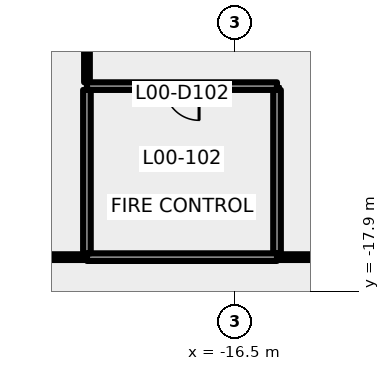
"""IFC4 building model, lengths in metres.
Left out: names, types, materials, properties, quantities, classifications, styles, units other than length and angle.
Written with IfcOpenShell. Run it as: python <this file> out.ifc"""

import sys

from ifc_helpers import new_model, si_unit, direction, frame, frame_2d, origin, place, context, subcontext, project, spatial, rectangle, extrude, element, fill, save


model = new_model("IFC4")
c1 = context("Model", 3, precision=1e-05, world=origin(), true_north=direction((0.0, 1.0)))
c2 = subcontext(c1, "Body", "Model", "MODEL_VIEW")
j1 = project(units=[si_unit("LENGTHUNIT", "METRE"), si_unit("PLANEANGLEUNIT", "RADIAN")], contexts=[c1])
p1 = place(None, origin())
s1 = spatial("IfcSite", under=j1, at=p1, CompositionType="ELEMENT")
p2 = place(p1, origin())
s2 = spatial("IfcBuilding", under=s1, at=p2, CompositionType="ELEMENT")
p3 = place(p2, origin())
s3 = spatial("IfcBuildingStorey", under=s2, at=p3, CompositionType="ELEMENT", Elevation=0.0)
p4 = place(p3, frame((-15.4, -12.5, 0.0), z_axis=(0.0, 0.0, 1.0), x_axis=(-1.0, 0.0, 0.0)))
e1 = element("IfcWall", 1, at=p4, inside=s3, PredefinedType="PARTITIONING", context=c2, shape_type="SweptSolid", body=[
    extrude(rectangle(XDim=5.0, YDim=0.2, at=frame_2d((2.5, 0.0))), origin(), (0.0, 0.0, 1.0), 6.7),
])
p5 = place(p4, frame((2.05, 0.0, 0.0)))
e2 = element("IfcOpeningElement", 2, at=p5, cuts=e1, PredefinedType="OPENING", context=c2, shape_type="SweptSolid", body=[
    extrude(rectangle(XDim=0.9, YDim=2.1, at=frame_2d((0.45, 1.05))), frame((0.0, 0.111, 0.0), z_axis=(0.0, -1.0, 0.0), x_axis=(1.0, 0.0, 0.0)), (0.0, 0.0, 1.0), 0.221),
])
p6 = place(p3, frame((-15.399, -16.9, 0.0), z_axis=(0.0, 0.0, 1.0), x_axis=(0.0, 1.0, 0.0)))
e3 = element("IfcWall", 3, at=p6, inside=s3, PredefinedType="PARTITIONING", context=c2, shape_type="SweptSolid", body=[
    extrude(rectangle(XDim=4.3, YDim=0.2, at=frame_2d((2.15, 0.0))), origin(), (0.0, 0.0, 1.0), 6.0),
])
p7 = place(p3, frame((-15.4, -17.0, 0.0), z_axis=(0.0, 0.0, 1.0), x_axis=(1.0, 0.0, 0.0)))
e4 = element("IfcWall", 4, at=p7, inside=s3, PredefinedType="PARTITIONING", context=c2, shape_type="SweptSolid", body=[
    extrude(rectangle(XDim=35.8, YDim=0.15, at=frame_2d((17.9, 0.0))), origin(), (0.0, 0.0, 1.0), 6.0),
])
p8 = place(p7, frame((17.0, 0.0, 0.0)))
e5 = element("IfcOpeningElement", 5, at=p8, cuts=e4, PredefinedType="OPENING", context=c2, shape_type="SweptSolid", body=[
    extrude(rectangle(XDim=1.8, YDim=2.1, at=frame_2d((0.9, 1.05))), frame((0.0, 0.085, 0.0), z_axis=(0.0, -1.0, 0.0), x_axis=(1.0, 0.0, 0.0)), (0.0, 0.0, 1.0), 0.171),
])
p9 = place(p7, frame((27.05, 0.0, 0.0)))
e6 = element("IfcOpeningElement", 6, at=p9, cuts=e4, PredefinedType="OPENING", context=c2, shape_type="SweptSolid", body=[
    extrude(rectangle(XDim=1.8, YDim=2.1, at=frame_2d((0.9, 1.05))), frame((0.0, 0.085, 0.0), z_axis=(0.0, -1.0, 0.0), x_axis=(1.0, 0.0, 0.0)), (0.0, 0.0, 1.0), 0.171),
])
p10 = place(p3, frame((-20.4, -12.4, 0.0), z_axis=(0.0, 0.0, 1.0), x_axis=(0.0, 1.0, 0.0)))
e7 = element("IfcWall", 7, at=p10, inside=s3, PredefinedType="PARTITIONING", context=c2, shape_type="SweptSolid", body=[
    extrude(rectangle(XDim=5.02, YDim=0.15, at=frame_2d((2.51, 0.0))), origin(), (0.0, 0.0, 1.0), 7.0),
])
p11 = place(p3, frame((-15.4, -17.0, 0.0), z_axis=(0.0, 0.0, 1.0), x_axis=(-1.0, 0.0, 0.0)))
e8 = element("IfcWall", 8, at=p11, inside=s3, PredefinedType="PARTITIONING", context=c2, shape_type="SweptSolid", body=[
    extrude(rectangle(XDim=5.0, YDim=0.2, at=frame_2d((2.5, 0.0))), origin(), (0.0, 0.0, 1.0), 6.39),
])
p12 = place(p3, frame((-20.401, -16.9, 0.0), z_axis=(0.0, 0.0, 1.0), x_axis=(0.0, 1.0, 0.0)))
e9 = element("IfcWall", 9, at=p12, inside=s3, PredefinedType="PARTITIONING", context=c2, shape_type="SweptSolid", body=[
    extrude(rectangle(XDim=4.3, YDim=0.2, at=frame_2d((2.15, 0.0))), origin(), (0.0, 0.0, 1.0), 6.0),
])
p13 = place(p3, frame((-36.74, -17.0, 0.0), z_axis=(0.0, 0.0, 1.0), x_axis=(1.0, 0.0, 0.0)))
e10 = element("IfcWall", 10, at=p13, inside=s3, PredefinedType="PARTITIONING", context=c2, shape_type="SweptSolid", body=[
    extrude(rectangle(XDim=16.34, YDim=0.15, at=frame_2d((8.17, 0.0))), origin(), (0.0, 0.0, 1.0), 6.0),
])
p14 = place(p13, frame((10.078, 0.0, 0.0)))
e11 = element("IfcOpeningElement", 11, at=p14, cuts=e10, PredefinedType="OPENING", context=c2, shape_type="SweptSolid", body=[
    extrude(rectangle(XDim=1.8, YDim=2.1, at=frame_2d((0.9, 1.05))), frame((0.0, 0.085, 0.0), z_axis=(0.0, -1.0, 0.0), x_axis=(1.0, 0.0, 0.0)), (0.0, 0.0, 1.0), 0.171),
])
p15 = place(p5, origin())
e12 = element("IfcDoor", 12, at=p15, inside=s3, OperationType="SINGLE_SWING_LEFT", PredefinedType="DOOR", context=c2, shape_type="SweptSolid", body=[
    extrude(rectangle(XDim=0.9, YDim=2.1, at=frame_2d((0.45, 1.05))), frame((0.0, 0.025, 0.0), z_axis=(0.0, -1.0, 0.0), x_axis=(1.0, 0.0, 0.0)), (0.0, 0.0, 1.0), 0.05),
])
fill(e2, e12)
save(model, sys.argv[1])
